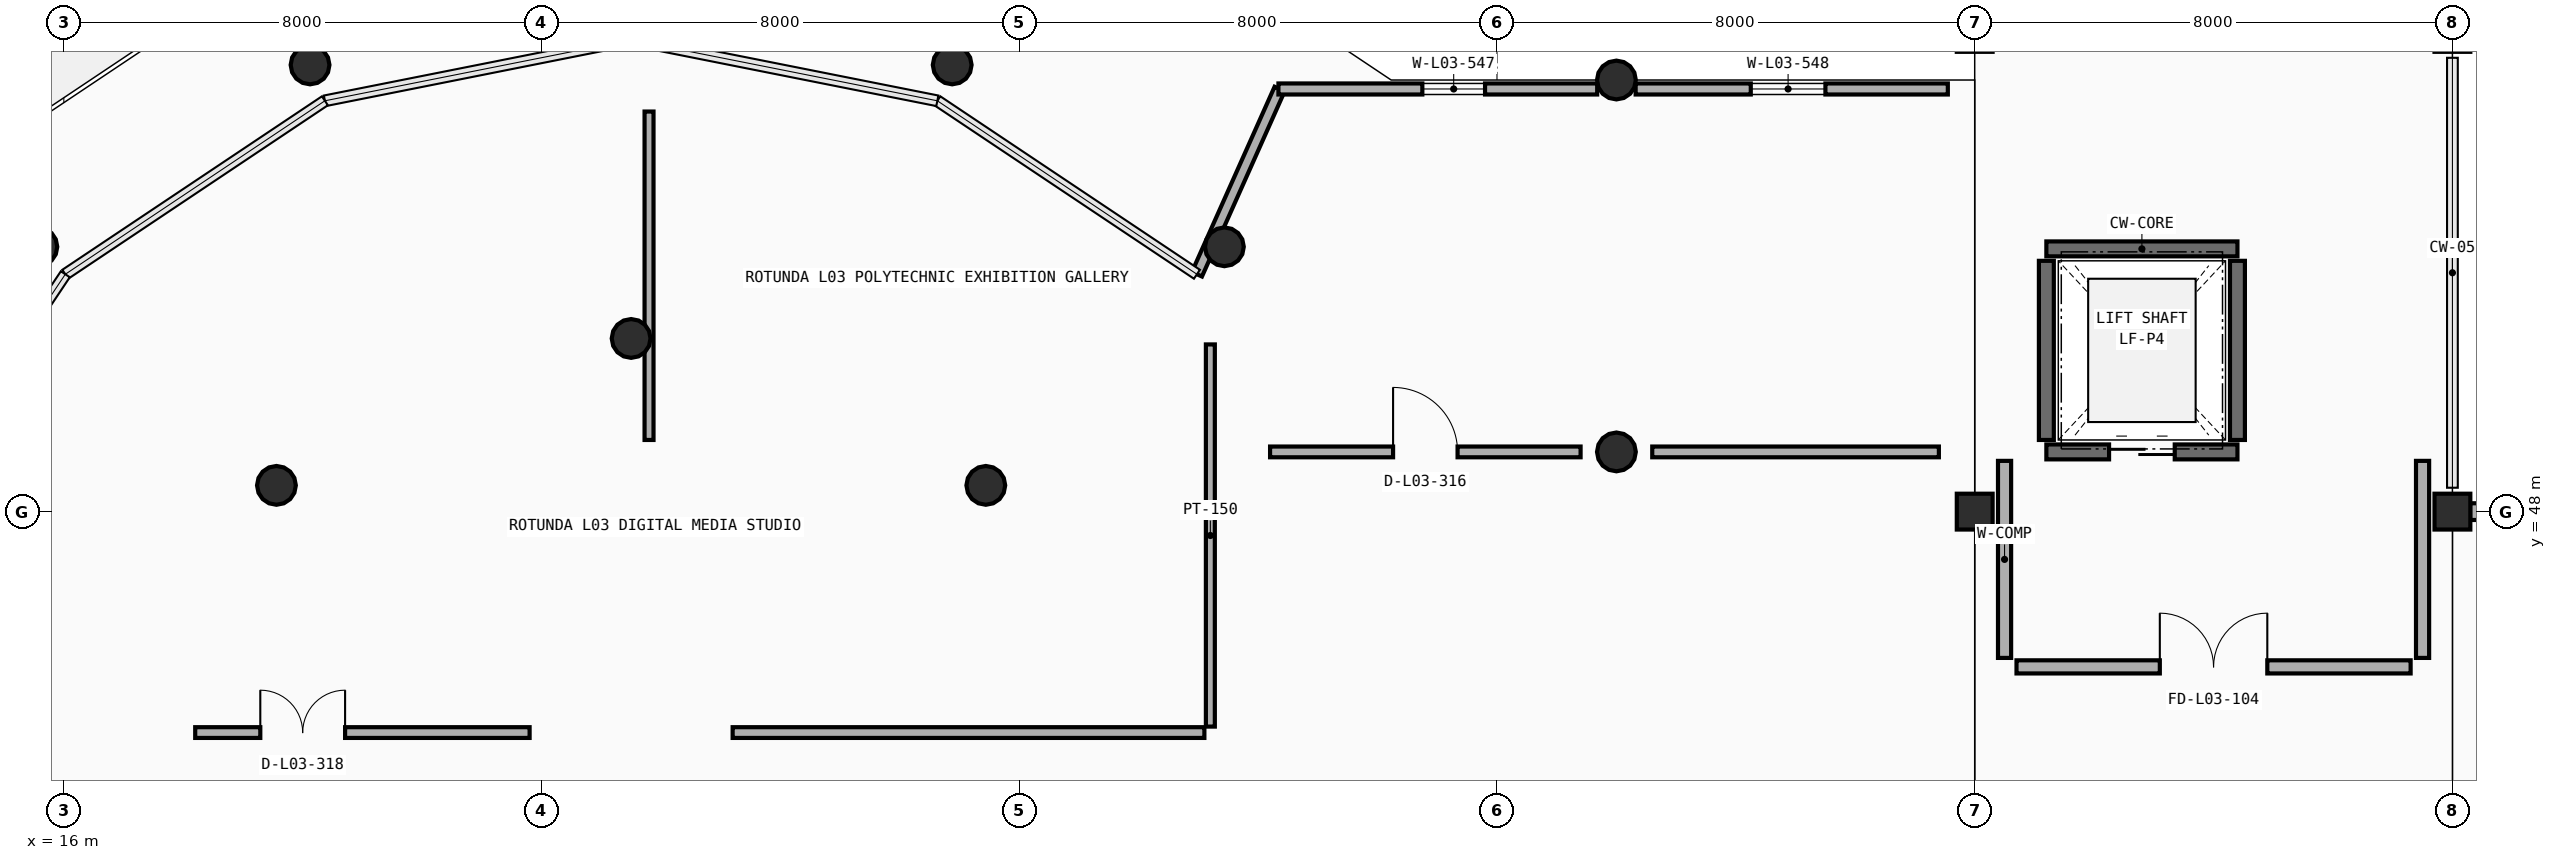
"""IFC4 building model, lengths in metres.
Left out: names, types, materials, properties, quantities, classifications, styles, units other than length and angle.
Written with IfcOpenShell. Run it as: python <this file> out.ifc"""

import sys

from ifc_helpers import new_model, si_unit, direction, frame, frame_2d, origin, origin_2d, place, context, subcontext, project, spatial, rectangle, circle, extrude, element, fill, save


model = new_model("IFC4")
c1 = context("Model", 3, precision=1e-05, world=origin(), true_north=direction((0.0, 1.0)))
c2 = subcontext(c1, "Body", "Model", "MODEL_VIEW")
j1 = project(units=[si_unit("LENGTHUNIT", "METRE"), si_unit("PLANEANGLEUNIT", "RADIAN")], contexts=[c1])
p1 = place(None, origin())
s1 = spatial("IfcSite", under=j1, at=p1, CompositionType="ELEMENT")
p2 = place(p1, origin())
s2 = spatial("IfcBuilding", under=s1, at=p2, CompositionType="ELEMENT")
p3 = place(p2, frame((0.0, 0.0, 9.6)))
s3 = spatial("IfcBuildingStorey", under=s2, at=p3, CompositionType="ELEMENT", Elevation=9.6)
for number, where, z_axis, x_axis in (
    (1, (48.0, 48.0, 0.0), (0.0, 0.0, 1.0), (1.0, 0.0, 0.0)),
    (2, (56.0, 48.0, 0.0), (0.0, 0.0, 1.0), (1.0, 0.0, 0.0)),
):
    element("IfcColumn", number, at=place(p3, frame(where, z_axis=z_axis, x_axis=x_axis)), inside=s3, PredefinedType="COLUMN", context=c2, shape_type="SweptSolid", body=[
        extrude(rectangle(XDim=0.6, YDim=0.6, at=origin_2d()), origin(), (0.0, 0.0, 1.0), 4.2),
    ])
for number, where, z_axis, x_axis in (
    (3, (19.56, 48.44, 0.0), (0.0, 0.0, 1.0), (1.0, 0.0, 0.0)),
    (4, (31.44, 48.44, 0.0), (0.0, 0.0, 1.0), (1.0, 0.0, 0.0)),
    (5, (42.0, 49.0, 0.0), (0.0, 0.0, 1.0), (1.0, 0.0, 0.0)),
    (6, (25.5, 50.9, 0.0), (0.0, 0.0, 1.0), (1.0, 0.0, 0.0)),
    (7, (15.565, 52.435, 0.0), (0.0, 0.0, 1.0), (1.0, 0.0, 0.0)),
    (8, (35.435, 52.435, 0.0), (0.0, 0.0, 1.0), (1.0, 0.0, 0.0)),
    (9, (42.0, 55.228, 0.0), (0.0, 0.0, 1.0), (1.0, 0.0, 0.0)),
    (10, (20.123, 55.48, 0.0), (0.0, 0.0, 1.0), (1.0, 0.0, 0.0)),
    (11, (30.877, 55.48, 0.0), (0.0, 0.0, 1.0), (1.0, 0.0, 0.0)),
):
    element("IfcColumn", number, at=place(p3, frame(where, z_axis=z_axis, x_axis=x_axis)), inside=s3, PredefinedType="COLUMN", context=c2, shape_type="SweptSolid", body=[
        extrude(circle(Radius=0.325, at=origin_2d()), origin(), (0.0, 0.0, 1.0), 4.2),
    ])
p4 = place(p3, frame((56.297, 48.0, 0.0), z_axis=(0.0, 0.0, 1.0), x_axis=(1.0, 0.0, 0.0)))
e12 = element("IfcWall", 12, at=p4, inside=s3, PredefinedType="STANDARD", context=c2, shape_type="SweptSolid", body=[
    extrude(rectangle(XDim=7.381, YDim=0.28, at=frame_2d((3.69, 0.0))), origin(), (0.0, 0.0, 1.0), 3.325),
])
p5 = place(p4, frame((2.283, 0.0, 0.9)))
e13 = element("IfcOpeningElement", 13, at=p5, cuts=e12, PredefinedType="OPENING", context=c2, shape_type="SweptSolid", body=[
    extrude(rectangle(XDim=1.65, YDim=1.55, at=frame_2d((0.825, 0.775))), frame((0.0, 0.15, 0.0), z_axis=(0.0, -1.0, 0.0), x_axis=(1.0, 0.0, 0.0)), (0.0, 0.0, 1.0), 0.3),
])
p6 = place(p3, frame((38.143, 55.143, 0.0), z_axis=(0.0, 0.0, 1.0), x_axis=(-0.831468390799, 0.555572061125, 0.0)))
e14 = element("IfcWall", 14, at=p6, inside=s3, PredefinedType="PARAPET", context=c2, shape_type="SweptSolid", body=[
    extrude(rectangle(XDim=6.977, YDim=0.2, at=frame_2d((3.488, 0.0))), origin(), (0.0, 0.0, 1.0), 1.15),
])
p7 = place(p3, frame((19.542, 56.472, 0.0), z_axis=(0.0, 0.0, 1.0), x_axis=(-0.831481620435, -0.555552261158, 0.0)))
e15 = element("IfcWall", 15, at=p7, inside=s3, PredefinedType="PARAPET", context=c2, shape_type="SweptSolid", body=[
    extrude(rectangle(XDim=5.618, YDim=0.18, at=frame_2d((2.809, 0.0))), origin(), (0.0, 0.0, 1.0), 1.15),
])
p8 = place(p3, frame((34.975, 51.975, 0.0), z_axis=(0.0, 0.0, 1.0), x_axis=(0.40761125598, 0.913155553013, 0.0)))
e16 = element("IfcWall", 16, at=p8, inside=s3, PredefinedType="STANDARD", context=c2, shape_type="SweptSolid", body=[
    extrude(rectangle(XDim=3.398, YDim=0.185, at=frame_2d((1.699, 0.0))), origin(), (0.0, 0.0, 1.0), 3.35),
])
p9 = place(p3, frame((36.34, 55.078, 0.0), z_axis=(0.0, 0.0, 1.0), x_axis=(1.0, 0.0, 0.0)))
e17 = element("IfcWall", 17, at=p9, inside=s3, PredefinedType="STANDARD", context=c2, shape_type="SweptSolid", body=[
    extrude(rectangle(XDim=5.338, YDim=0.185, at=frame_2d((2.669, 0.0))), origin(), (0.0, 0.0, 1.0), 3.325),
])
p10 = place(p9, frame((2.41, 0.0, 0.9)))
e18 = element("IfcOpeningElement", 18, at=p10, cuts=e17, PredefinedType="OPENING", context=c2, shape_type="SweptSolid", body=[
    extrude(rectangle(XDim=1.05, YDim=1.25, at=frame_2d((0.525, 0.625))), frame((0.0, 0.103, 0.0), z_axis=(0.0, -1.0, 0.0), x_axis=(1.0, 0.0, 0.0)), (0.0, 0.0, 1.0), 0.205),
])
p11 = place(p3, frame((42.322, 55.078, 0.0), z_axis=(0.0, 0.0, 1.0), x_axis=(1.0, 0.0, 0.0)))
e19 = element("IfcWall", 19, at=p11, inside=s3, PredefinedType="STANDARD", context=c2, shape_type="SweptSolid", body=[
    extrude(rectangle(XDim=5.228, YDim=0.185, at=frame_2d((2.614, 0.0))), origin(), (0.0, 0.0, 1.0), 3.325),
])
p12 = place(p11, frame((1.928, 0.0, 0.9)))
e20 = element("IfcOpeningElement", 20, at=p12, cuts=e19, PredefinedType="OPENING", context=c2, shape_type="SweptSolid", body=[
    extrude(rectangle(XDim=1.25, YDim=1.25, at=frame_2d((0.625, 0.625))), frame((0.0, 0.103, 0.0), z_axis=(0.0, -1.0, 0.0), x_axis=(1.0, 0.0, 0.0)), (0.0, 0.0, 1.0), 0.205),
])
p13 = place(p3, frame((12.878, 55.122, 2.95), z_axis=(0.0, 0.0, 1.0), x_axis=(0.831472806966, 0.555565451838, 0.0)))
e21 = element("IfcWall", 21, at=p13, inside=s3, PredefinedType="PARAPET", context=c2, shape_type="SweptSolid", body=[
    extrude(rectangle(XDim=6.965, YDim=0.2, at=frame_2d((3.482, 0.0))), origin(), (0.0, 0.0, 1.0), 1.56),
])
p14 = place(p3, frame((14.39, 53.832, 2.95), z_axis=(0.0, 0.0, 1.0), x_axis=(0.831462553548, 0.555580797046, 0.0)))
e22 = element("IfcWall", 22, at=p14, inside=s3, PredefinedType="PARAPET", context=c2, shape_type="SweptSolid", body=[
    extrude(rectangle(XDim=5.884, YDim=0.18, at=frame_2d((2.942, 0.0))), origin(), (0.0, 0.0, 1.0), 1.56),
])
p15 = place(p3, frame((49.2, 49.0, 0.0), z_axis=(0.0, 0.0, 1.0), x_axis=(1.0, 0.0, 0.0)))
e23 = element("IfcWall", 23, at=p15, inside=s3, PredefinedType="SOLIDWALL", context=c2, shape_type="SweptSolid", body=[
    extrude(rectangle(XDim=3.2, YDim=0.25, at=frame_2d((1.6, 0.0))), origin(), (0.0, 0.0, 1.0), 4.2),
])
p16 = place(p15, frame((1.05, 0.0, 0.0)))
e24 = element("IfcOpeningElement", 24, at=p16, cuts=e23, PredefinedType="OPENING", context=c2, shape_type="SweptSolid", body=[
    extrude(rectangle(XDim=1.1, YDim=2.15, at=frame_2d((0.55, 1.075))), frame((0.0, 0.135, 0.0), z_axis=(0.0, -1.0, 0.0), x_axis=(1.0, 0.0, 0.0)), (0.0, 0.0, 1.0), 0.27),
])
p17 = place(p3, frame((49.2, 52.4, 0.0), z_axis=(0.0, 0.0, 1.0), x_axis=(1.0, 0.0, 0.0)))
e25 = element("IfcWall", 25, at=p17, inside=s3, PredefinedType="SOLIDWALL", context=c2, shape_type="SweptSolid", body=[
    extrude(rectangle(XDim=3.2, YDim=0.25, at=frame_2d((1.6, 0.0))), origin(), (0.0, 0.0, 1.0), 4.2),
])
for number, where, z_axis, x_axis in (
    (26, (49.2, 49.2, 0.0), (0.0, 0.0, 1.0), (0.0, 1.0, 0.0)),
    (27, (52.4, 49.2, 0.0), (0.0, 0.0, 1.0), (0.0, 1.0, 0.0)),
):
    element("IfcWall", number, at=place(p3, frame(where, z_axis=z_axis, x_axis=x_axis)), inside=s3, PredefinedType="SOLIDWALL", context=c2, shape_type="SweptSolid", body=[
        extrude(rectangle(XDim=3.0, YDim=0.25, at=frame_2d((1.5, 0.0))), origin(), (0.0, 0.0, 1.0), 4.2),
    ])
p18 = place(p3, frame((48.7, 45.4, 0.0), z_axis=(0.0, 0.0, 1.0), x_axis=(1.0, 0.0, 0.0)))
e28 = element("IfcWall", 28, at=p18, inside=s3, PredefinedType="PARTITIONING", context=c2, shape_type="SweptSolid", body=[
    extrude(rectangle(XDim=6.6, YDim=0.22, at=frame_2d((3.3, 0.0))), origin(), (0.0, 0.0, 1.0), 3.3),
])
p19 = place(p18, frame((2.4, 0.0, 0.0)))
e29 = element("IfcOpeningElement", 29, at=p19, cuts=e28, PredefinedType="OPENING", context=c2, shape_type="SweptSolid", body=[
    extrude(rectangle(XDim=1.8, YDim=2.2, at=frame_2d((0.9, 1.1))), frame((0.0, 0.12, 0.0), z_axis=(0.0, -1.0, 0.0), x_axis=(1.0, 0.0, 0.0)), (0.0, 0.0, 1.0), 0.24),
])
for number, where, z_axis, x_axis in (
    (30, (48.5, 45.55, 0.0), (0.0, 0.0, 1.0), (0.0, 1.0, 0.0)),
    (31, (55.5, 45.55, 0.0), (0.0, 0.0, 1.0), (0.0, 1.0, 0.0)),
):
    element("IfcWall", number, at=place(p3, frame(where, z_axis=z_axis, x_axis=x_axis)), inside=s3, PredefinedType="PARTITIONING", context=c2, shape_type="SweptSolid", body=[
        extrude(rectangle(XDim=3.3, YDim=0.22, at=frame_2d((1.65, 0.0))), origin(), (0.0, 0.0, 1.0), 3.225),
    ])
p20 = place(p3, frame((42.6, 49.0, 0.0), z_axis=(0.0, 0.0, 1.0), x_axis=(1.0, 0.0, 0.0)))
e32 = element("IfcWall", 32, at=p20, inside=s3, PredefinedType="PARTITIONING", context=c2, shape_type="SweptSolid", body=[
    extrude(rectangle(XDim=4.8, YDim=0.18, at=frame_2d((2.4, 0.0))), origin(), (0.0, 0.0, 1.0), 3.275),
])
p21 = place(p3, frame((25.8, 49.2, 0.0), z_axis=(0.0, 0.0, 1.0), x_axis=(0.0, 1.0, 0.0)))
e33 = element("IfcWall", 33, at=p21, inside=s3, PredefinedType="PARTITIONING", context=c2, shape_type="SweptSolid", body=[
    extrude(rectangle(XDim=5.5, YDim=0.15, at=frame_2d((2.75, 0.0))), origin(), (0.0, 0.0, 1.0), 3.175),
])
p22 = place(p3, frame((36.2, 49.0, 0.0), z_axis=(0.0, 0.0, 1.0), x_axis=(1.0, 0.0, 0.0)))
e34 = element("IfcWall", 34, at=p22, inside=s3, PredefinedType="PARTITIONING", context=c2, shape_type="SweptSolid", body=[
    extrude(rectangle(XDim=5.2, YDim=0.18, at=frame_2d((2.6, 0.0))), origin(), (0.0, 0.0, 1.0), 3.3),
])
p23 = place(p22, frame((2.06, 0.0, 0.0)))
e35 = element("IfcOpeningElement", 35, at=p23, cuts=e34, PredefinedType="OPENING", context=c2, shape_type="SweptSolid", body=[
    extrude(rectangle(XDim=1.08, YDim=2.15, at=frame_2d((0.54, 1.075))), frame((0.0, 0.1, 0.0), z_axis=(0.0, -1.0, 0.0), x_axis=(1.0, 0.0, 0.0)), (0.0, 0.0, 1.0), 0.2),
])
p24 = place(p3, frame((27.2, 44.3, 0.0), z_axis=(0.0, 0.0, 1.0), x_axis=(1.0, 0.0, 0.0)))
e36 = element("IfcWall", 36, at=p24, inside=s3, PredefinedType="PARTITIONING", context=c2, shape_type="SweptSolid", body=[
    extrude(rectangle(XDim=7.9, YDim=0.18, at=frame_2d((3.95, 0.0))), origin(), (0.0, 0.0, 1.0), 3.3),
])
p25 = place(p3, frame((35.2, 44.4, 0.0), z_axis=(0.0, 0.0, 1.0), x_axis=(0.0, 1.0, 0.0)))
e37 = element("IfcWall", 37, at=p25, inside=s3, PredefinedType="PARTITIONING", context=c2, shape_type="SweptSolid", body=[
    extrude(rectangle(XDim=6.4, YDim=0.15, at=frame_2d((3.2, 0.0))), origin(), (0.0, 0.0, 1.0), 3.3),
])
p26 = place(p3, frame((18.2, 44.3, 0.0), z_axis=(0.0, 0.0, 1.0), x_axis=(1.0, 0.0, 0.0)))
e38 = element("IfcWall", 38, at=p26, inside=s3, PredefinedType="PARTITIONING", context=c2, shape_type="SweptSolid", body=[
    extrude(rectangle(XDim=5.6, YDim=0.18, at=frame_2d((2.8, 0.0))), origin(), (0.0, 0.0, 1.0), 3.3),
])
p27 = place(p26, frame((1.09, 0.0, 0.0)))
e39 = element("IfcOpeningElement", 39, at=p27, cuts=e38, PredefinedType="OPENING", context=c2, shape_type="SweptSolid", body=[
    extrude(rectangle(XDim=1.42, YDim=2.2, at=frame_2d((0.71, 1.1))), frame((0.0, 0.1, 0.0), z_axis=(0.0, -1.0, 0.0), x_axis=(1.0, 0.0, 0.0)), (0.0, 0.0, 1.0), 0.2),
])
p28 = place(p10, origin())
e40 = element("IfcWindow", 40, at=p28, inside=s3, PartitioningType="SINGLE_PANEL", PredefinedType="WINDOW", context=c2, shape_type="SweptSolid", body=[
    extrude(rectangle(XDim=1.05, YDim=1.25, at=frame_2d((0.525, 0.625))), frame((0.0, 0.03, 0.0), z_axis=(0.0, -1.0, 0.0), x_axis=(1.0, 0.0, 0.0)), (0.0, 0.0, 1.0), 0.06),
])
fill(e18, e40)
p29 = place(p12, origin())
e41 = element("IfcWindow", 41, at=p29, inside=s3, PartitioningType="SINGLE_PANEL", PredefinedType="WINDOW", context=c2, shape_type="SweptSolid", body=[
    extrude(rectangle(XDim=1.25, YDim=1.25, at=frame_2d((0.625, 0.625))), frame((0.0, 0.03, 0.0), z_axis=(0.0, -1.0, 0.0), x_axis=(1.0, 0.0, 0.0)), (0.0, 0.0, 1.0), 0.06),
])
fill(e20, e41)
p30 = place(p16, origin())
e42 = element("IfcDoor", 42, at=p30, inside=s3, OperationType="DOUBLE_DOOR_SLIDING", PredefinedType="DOOR", context=c2, shape_type="SweptSolid", body=[
    extrude(rectangle(XDim=1.1, YDim=2.15, at=frame_2d((0.55, 1.075))), frame((0.0, 0.025, 0.0), z_axis=(0.0, -1.0, 0.0), x_axis=(1.0, 0.0, 0.0)), (0.0, 0.0, 1.0), 0.05),
])
fill(e24, e42)
p31 = place(p19, origin())
e43 = element("IfcDoor", 43, at=p31, inside=s3, OperationType="DOUBLE_DOOR_SINGLE_SWING", PredefinedType="DOOR", context=c2, shape_type="SweptSolid", body=[
    extrude(rectangle(XDim=1.8, YDim=2.2, at=frame_2d((0.9, 1.1))), frame((0.0, 0.025, 0.0), z_axis=(0.0, -1.0, 0.0), x_axis=(1.0, 0.0, 0.0)), (0.0, 0.0, 1.0), 0.05),
])
fill(e29, e43)
p32 = place(p23, origin())
e44 = element("IfcDoor", 44, at=p32, inside=s3, OperationType="SINGLE_SWING_LEFT", PredefinedType="DOOR", context=c2, shape_type="SweptSolid", body=[
    extrude(rectangle(XDim=1.08, YDim=2.15, at=frame_2d((0.54, 1.075))), frame((0.0, 0.025, 0.0), z_axis=(0.0, -1.0, 0.0), x_axis=(1.0, 0.0, 0.0)), (0.0, 0.0, 1.0), 0.05),
])
fill(e35, e44)
p33 = place(p27, origin())
e45 = element("IfcDoor", 45, at=p33, inside=s3, OperationType="DOUBLE_DOOR_SINGLE_SWING", PredefinedType="DOOR", context=c2, shape_type="SweptSolid", body=[
    extrude(rectangle(XDim=1.42, YDim=2.2, at=frame_2d((0.71, 1.1))), frame((0.0, 0.025, 0.0), z_axis=(0.0, -1.0, 0.0), x_axis=(1.0, 0.0, 0.0)), (0.0, 0.0, 1.0), 0.05),
])
fill(e39, e45)
save(model, sys.argv[1])
